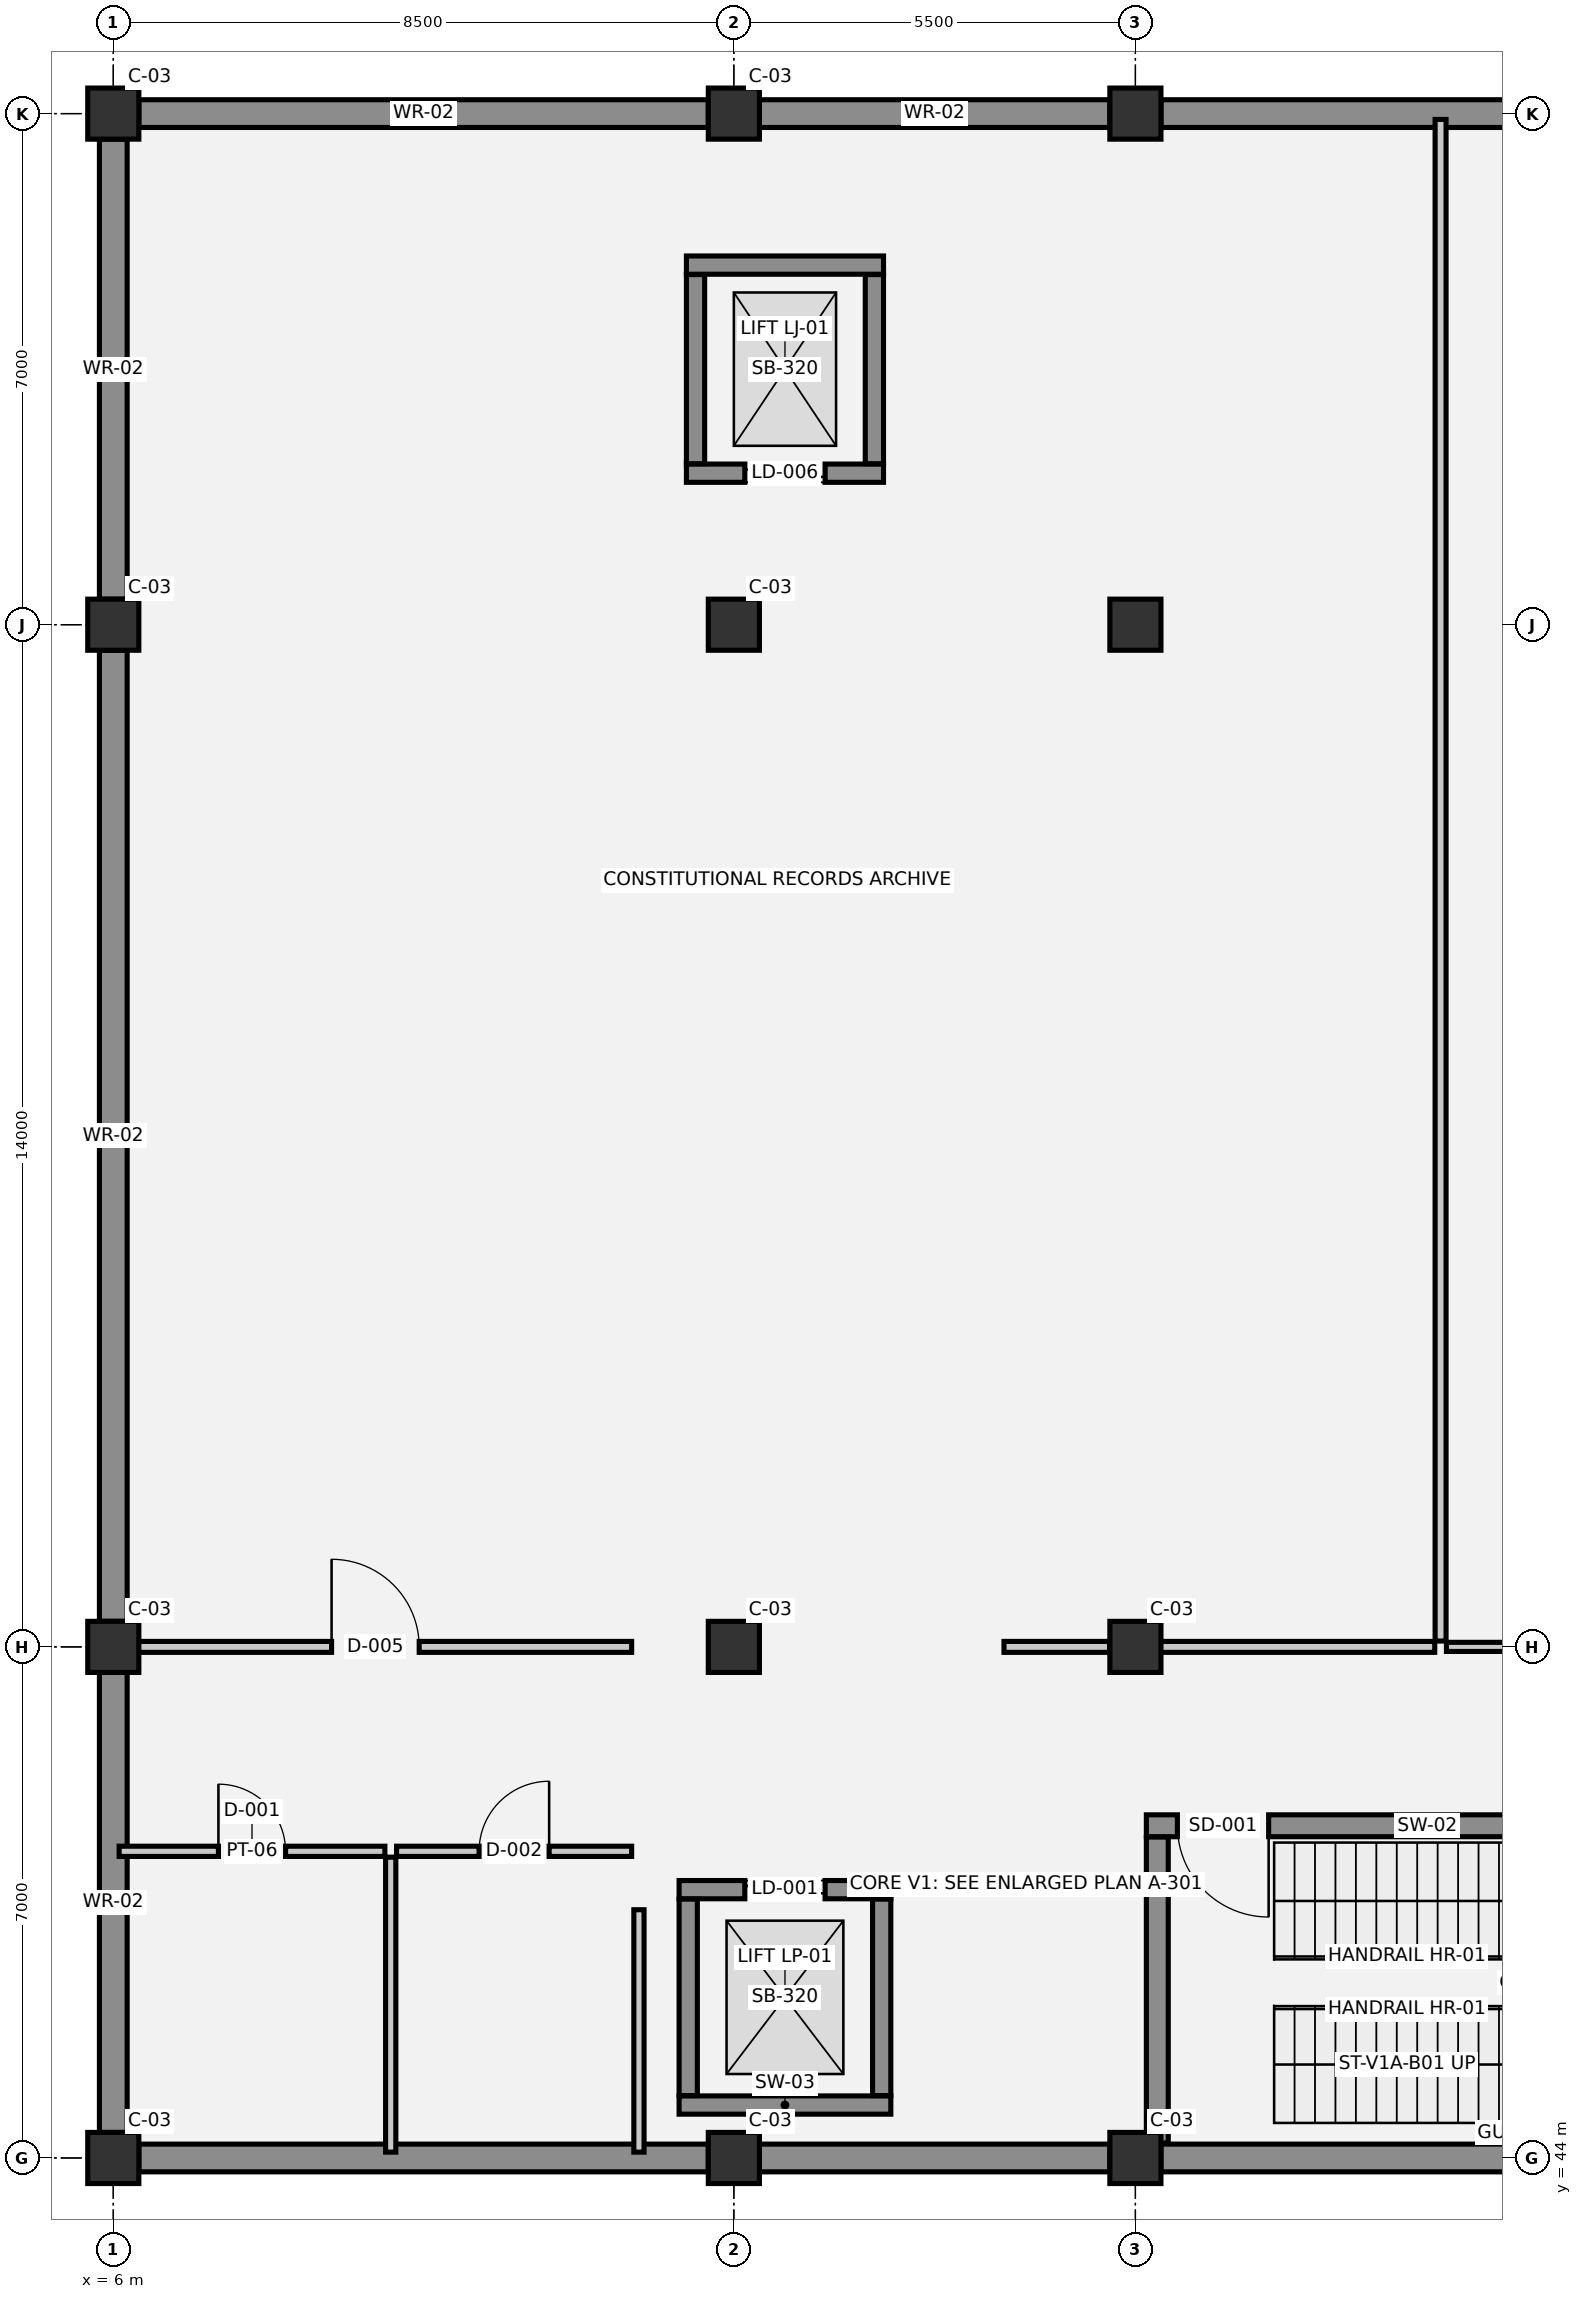
"""IFC4 building model, lengths in metres.
Left out: names, types, materials, properties, quantities, classifications, styles, units other than length and angle.
Written with IfcOpenShell. Run it as: python <this file> out.ifc"""

import sys

from ifc_helpers import new_model, si_unit, direction, frame, frame_2d, origin, origin_2d, place, context, subcontext, project, spatial, rectangle, extrude, element, fill, save


model = new_model("IFC4")
c1 = context("Model", 3, precision=1e-05, world=origin(), true_north=direction((0.0, 1.0)))
c2 = subcontext(c1, "Body", "Model", "MODEL_VIEW")
j1 = project(units=[si_unit("LENGTHUNIT", "METRE"), si_unit("PLANEANGLEUNIT", "RADIAN")], contexts=[c1])
p1 = place(None, origin())
s1 = spatial("IfcSite", under=j1, at=p1, CompositionType="ELEMENT")
p2 = place(p1, origin())
s2 = spatial("IfcBuilding", under=s1, at=p2, CompositionType="ELEMENT")
p3 = place(p2, frame((0.0, 0.0, -4.5)))
s3 = spatial("IfcBuildingStorey", under=s2, at=p3, CompositionType="ELEMENT", Elevation=-4.5)
for number, where, z_axis, x_axis in (
    (1, (6.0, 44.0, 0.0), (0.0, 0.0, 1.0), (1.0, 0.0, 0.0)),
    (2, (6.0, 51.0, 0.0), (0.0, 0.0, 1.0), (1.0, 0.0, 0.0)),
    (3, (6.0, 65.0, 0.0), (0.0, 0.0, 1.0), (1.0, 0.0, 0.0)),
    (4, (6.0, 72.0, 0.0), (0.0, 0.0, 1.0), (1.0, 0.0, 0.0)),
    (5, (14.5, 44.0, 0.0), (0.0, 0.0, 1.0), (1.0, 0.0, 0.0)),
    (6, (14.5, 51.0, 0.0), (0.0, 0.0, 1.0), (1.0, 0.0, 0.0)),
    (7, (14.5, 65.0, 0.0), (0.0, 0.0, 1.0), (1.0, 0.0, 0.0)),
    (8, (14.5, 72.0, 0.0), (0.0, 0.0, 1.0), (1.0, 0.0, 0.0)),
    (9, (20.0, 44.0, 0.0), (0.0, 0.0, 1.0), (1.0, 0.0, 0.0)),
    (10, (20.0, 51.0, 0.0), (0.0, 0.0, 1.0), (1.0, 0.0, 0.0)),
    (11, (20.0, 65.0, 0.0), (0.0, 0.0, 1.0), (1.0, 0.0, 0.0)),
    (12, (20.0, 72.0, 0.0), (0.0, 0.0, 1.0), (1.0, 0.0, 0.0)),
):
    element("IfcColumn", number, at=place(p3, frame(where, z_axis=z_axis, x_axis=x_axis)), inside=s3, PredefinedType="COLUMN", context=c2, shape_type="SweptSolid", body=[
        extrude(rectangle(XDim=0.7, YDim=0.7, at=origin_2d()), origin(), (0.0, 0.0, 1.0), 4.5),
    ])
p4 = place(p3, frame((6.0, 44.35, 0.0), z_axis=(0.0, 0.0, 1.0), x_axis=(0.0, 1.0, 0.0)))
e13 = element("IfcWall", 13, at=p4, inside=s3, PredefinedType="STANDARD", context=c2, shape_type="SweptSolid", body=[
    extrude(rectangle(XDim=6.3, YDim=0.38, at=frame_2d((3.15, 0.0))), origin(), (0.0, 0.0, 1.0), 4.24),
])
p5 = place(p3, frame((6.0, 51.35, 0.0), z_axis=(0.0, 0.0, 1.0), x_axis=(0.0, 1.0, 0.0)))
e14 = element("IfcWall", 14, at=p5, inside=s3, PredefinedType="STANDARD", context=c2, shape_type="SweptSolid", body=[
    extrude(rectangle(XDim=13.3, YDim=0.38, at=frame_2d((6.65, 0.0))), origin(), (0.0, 0.0, 1.0), 4.24),
])
p6 = place(p3, frame((6.0, 65.35, 0.0), z_axis=(0.0, 0.0, 1.0), x_axis=(0.0, 1.0, 0.0)))
e15 = element("IfcWall", 15, at=p6, inside=s3, PredefinedType="STANDARD", context=c2, shape_type="SweptSolid", body=[
    extrude(rectangle(XDim=6.3, YDim=0.38, at=frame_2d((3.15, 0.0))), origin(), (0.0, 0.0, 1.0), 4.24),
])
p7 = place(p3, frame((6.35, 72.0, 0.0), z_axis=(0.0, 0.0, 1.0), x_axis=(1.0, 0.0, 0.0)))
e16 = element("IfcWall", 16, at=p7, inside=s3, PredefinedType="STANDARD", context=c2, shape_type="SweptSolid", body=[
    extrude(rectangle(XDim=7.8, YDim=0.38, at=frame_2d((3.9, 0.0))), origin(), (0.0, 0.0, 1.0), 4.24),
])
p8 = place(p3, frame((14.85, 72.0, 0.0), z_axis=(0.0, 0.0, 1.0), x_axis=(1.0, 0.0, 0.0)))
e17 = element("IfcWall", 17, at=p8, inside=s3, PredefinedType="STANDARD", context=c2, shape_type="SweptSolid", body=[
    extrude(rectangle(XDim=4.8, YDim=0.38, at=frame_2d((2.4, 0.0))), origin(), (0.0, 0.0, 1.0), 4.24),
])
for number, where, z_axis, x_axis in (
    (18, (20.35, 72.0, 0.0), (0.0, 0.0, 1.0), (1.0, 0.0, 0.0)),
    (19, (34.65, 44.0, 0.0), (0.0, 0.0, 1.0), (-1.0, 0.0, 0.0)),
):
    element("IfcWall", number, at=place(p3, frame(where, z_axis=z_axis, x_axis=x_axis)), inside=s3, PredefinedType="STANDARD", context=c2, shape_type="SweptSolid", body=[
        extrude(rectangle(XDim=14.3, YDim=0.38, at=frame_2d((7.15, 0.0))), origin(), (0.0, 0.0, 1.0), 4.24),
    ])
p9 = place(p3, frame((19.65, 44.0, 0.0), z_axis=(0.0, 0.0, 1.0), x_axis=(-1.0, 0.0, 0.0)))
e20 = element("IfcWall", 20, at=p9, inside=s3, PredefinedType="STANDARD", context=c2, shape_type="SweptSolid", body=[
    extrude(rectangle(XDim=4.8, YDim=0.38, at=frame_2d((2.4, 0.0))), origin(), (0.0, 0.0, 1.0), 4.24),
])
p10 = place(p3, frame((14.15, 44.0, 0.0), z_axis=(0.0, 0.0, 1.0), x_axis=(-1.0, 0.0, 0.0)))
e21 = element("IfcWall", 21, at=p10, inside=s3, PredefinedType="STANDARD", context=c2, shape_type="SweptSolid", body=[
    extrude(rectangle(XDim=7.8, YDim=0.38, at=frame_2d((3.9, 0.0))), origin(), (0.0, 0.0, 1.0), 4.24),
])
p11 = place(p3, frame((13.75, 44.725, 0.0), z_axis=(0.0, 0.0, 1.0), x_axis=(1.0, 0.0, 0.0)))
e22 = element("IfcWall", 22, at=p11, inside=s3, PredefinedType="SHEAR", context=c2, shape_type="SweptSolid", body=[
    extrude(rectangle(XDim=2.9, YDim=0.25, at=frame_2d((1.45, 0.0))), origin(), (0.0, 0.0, 1.0), 4.5),
])
p12 = place(p3, frame((16.65, 47.675, 0.0), z_axis=(0.0, 0.0, 1.0), x_axis=(-1.0, 0.0, 0.0)))
e23 = element("IfcWall", 23, at=p12, inside=s3, PredefinedType="SHEAR", context=c2, shape_type="SweptSolid", body=[
    extrude(rectangle(XDim=2.9, YDim=0.25, at=frame_2d((1.45, 0.0))), origin(), (0.0, 0.0, 1.0), 4.5),
])
p13 = place(p12, frame((0.9, 0.0, 0.0)))
e24 = element("IfcOpeningElement", 24, at=p13, cuts=e23, PredefinedType="OPENING", context=c2, shape_type="SweptSolid", body=[
    extrude(rectangle(XDim=1.1, YDim=2.15, at=frame_2d((0.55, 1.075))), frame((0.0, 0.135, 0.0), z_axis=(0.0, -1.0, 0.0), x_axis=(1.0, 0.0, 0.0)), (0.0, 0.0, 1.0), 0.27),
])
for number, where, z_axis, x_axis in (
    (25, (13.875, 47.545, 0.0), (0.0, 0.0, 1.0), (0.0, -1.0, 0.0)),
    (26, (16.525, 44.855, 0.0), (0.0, 0.0, 1.0), (0.0, 1.0, 0.0)),
):
    element("IfcWall", number, at=place(p3, frame(where, z_axis=z_axis, x_axis=x_axis)), inside=s3, PredefinedType="SHEAR", context=c2, shape_type="SweptSolid", body=[
        extrude(rectangle(XDim=2.69, YDim=0.25, at=frame_2d((1.345, 0.0))), origin(), (0.0, 0.0, 1.0), 4.5),
    ])
p14 = place(p3, frame((13.85, 67.075, 0.0), z_axis=(0.0, 0.0, 1.0), x_axis=(1.0, 0.0, 0.0)))
e27 = element("IfcWall", 27, at=p14, inside=s3, PredefinedType="SHEAR", context=c2, shape_type="SweptSolid", body=[
    extrude(rectangle(XDim=2.7, YDim=0.25, at=frame_2d((1.35, 0.0))), origin(), (0.0, 0.0, 1.0), 4.5),
])
p15 = place(p14, frame((0.8, 0.0, 0.0)))
e28 = element("IfcOpeningElement", 28, at=p15, cuts=e27, PredefinedType="OPENING", context=c2, shape_type="SweptSolid", body=[
    extrude(rectangle(XDim=1.1, YDim=2.15, at=frame_2d((0.55, 1.075))), frame((0.0, 0.135, 0.0), z_axis=(0.0, -1.0, 0.0), x_axis=(1.0, 0.0, 0.0)), (0.0, 0.0, 1.0), 0.27),
])
p16 = place(p3, frame((16.55, 69.925, 0.0), z_axis=(0.0, 0.0, 1.0), x_axis=(-1.0, 0.0, 0.0)))
e29 = element("IfcWall", 29, at=p16, inside=s3, PredefinedType="SHEAR", context=c2, shape_type="SweptSolid", body=[
    extrude(rectangle(XDim=2.7, YDim=0.25, at=frame_2d((1.35, 0.0))), origin(), (0.0, 0.0, 1.0), 4.5),
])
for number, where, z_axis, x_axis in (
    (30, (13.975, 69.795, 0.0), (0.0, 0.0, 1.0), (0.0, -1.0, 0.0)),
    (31, (16.425, 67.205, 0.0), (0.0, 0.0, 1.0), (0.0, 1.0, 0.0)),
):
    element("IfcWall", number, at=place(p3, frame(where, z_axis=z_axis, x_axis=x_axis)), inside=s3, PredefinedType="SHEAR", context=c2, shape_type="SweptSolid", body=[
        extrude(rectangle(XDim=2.59, YDim=0.25, at=frame_2d((1.295, 0.0))), origin(), (0.0, 0.0, 1.0), 4.5),
    ])
p17 = place(p3, frame((27.85, 48.55, 0.0), z_axis=(0.0, 0.0, 1.0), x_axis=(-1.0, 0.0, 0.0)))
e32 = element("IfcWall", 32, at=p17, inside=s3, PredefinedType="SHEAR", context=c2, shape_type="SweptSolid", body=[
    extrude(rectangle(XDim=7.7, YDim=0.3, at=frame_2d((3.85, 0.0))), origin(), (0.0, 0.0, 1.0), 4.24),
])
p18 = place(p17, frame((6.025, 0.0, 0.0)))
e33 = element("IfcOpeningElement", 33, at=p18, cuts=e32, PredefinedType="OPENING", context=c2, shape_type="SweptSolid", body=[
    extrude(rectangle(XDim=1.25, YDim=2.15, at=frame_2d((0.625, 1.075))), frame((0.0, 0.16, 0.0), z_axis=(0.0, -1.0, 0.0), x_axis=(1.0, 0.0, 0.0)), (0.0, 0.0, 1.0), 0.32),
])
p19 = place(p3, frame((20.3, 48.395, 0.0), z_axis=(0.0, 0.0, 1.0), x_axis=(0.0, -1.0, 0.0)))
e34 = element("IfcWall", 34, at=p19, inside=s3, PredefinedType="SHEAR", context=c2, shape_type="SweptSolid", body=[
    extrude(rectangle(XDim=4.19, YDim=0.3, at=frame_2d((2.095, 0.0))), origin(), (0.0, 0.0, 1.0), 4.24),
])
p20 = place(p3, frame((6.08, 48.2, 0.0), z_axis=(0.0, 0.0, 1.0), x_axis=(1.0, 0.0, 0.0)))
e35 = element("IfcWall", 35, at=p20, inside=s3, PredefinedType="PLUMBINGWALL", context=c2, shape_type="SweptSolid", body=[
    extrude(rectangle(XDim=3.64, YDim=0.14, at=frame_2d((1.82, 0.0))), origin(), (0.0, 0.0, 1.0), 4.14),
])
p21 = place(p20, frame((1.36, 0.0, 0.0)))
e36 = element("IfcOpeningElement", 36, at=p21, cuts=e35, PredefinedType="OPENING", context=c2, shape_type="SweptSolid", body=[
    extrude(rectangle(XDim=0.92, YDim=2.1, at=frame_2d((0.46, 1.05))), frame((0.0, 0.08, 0.0), z_axis=(0.0, -1.0, 0.0), x_axis=(1.0, 0.0, 0.0)), (0.0, 0.0, 1.0), 0.16),
])
p22 = place(p3, frame((9.88, 48.2, 0.0), z_axis=(0.0, 0.0, 1.0), x_axis=(1.0, 0.0, 0.0)))
e37 = element("IfcWall", 37, at=p22, inside=s3, PredefinedType="PLUMBINGWALL", context=c2, shape_type="SweptSolid", body=[
    extrude(rectangle(XDim=3.22, YDim=0.14, at=frame_2d((1.61, 0.0))), origin(), (0.0, 0.0, 1.0), 4.14),
])
p23 = place(p22, frame((1.13, 0.0, 0.0)))
e38 = element("IfcOpeningElement", 38, at=p23, cuts=e37, PredefinedType="OPENING", context=c2, shape_type="SweptSolid", body=[
    extrude(rectangle(XDim=0.96, YDim=2.1, at=frame_2d((0.48, 1.05))), frame((0.0, 0.08, 0.0), z_axis=(0.0, -1.0, 0.0), x_axis=(1.0, 0.0, 0.0)), (0.0, 0.0, 1.0), 0.16),
])
p24 = place(p3, frame((6.08, 51.0, 0.0), z_axis=(0.0, 0.0, 1.0), x_axis=(1.0, 0.0, 0.0)))
e39 = element("IfcWall", 39, at=p24, inside=s3, PredefinedType="PARTITIONING", context=c2, shape_type="SweptSolid", body=[
    extrude(rectangle(XDim=7.02, YDim=0.15, at=frame_2d((3.51, 0.0))), origin(), (0.0, 0.0, 1.0), 3.53),
])
p25 = place(p24, frame((2.91, 0.0, 0.0)))
e40 = element("IfcOpeningElement", 40, at=p25, cuts=e39, PredefinedType="OPENING", context=c2, shape_type="SweptSolid", body=[
    extrude(rectangle(XDim=1.2, YDim=2.15, at=frame_2d((0.6, 1.075))), frame((0.0, 0.085, 0.0), z_axis=(0.0, -1.0, 0.0), x_axis=(1.0, 0.0, 0.0)), (0.0, 0.0, 1.0), 0.17),
])
p26 = place(p3, frame((18.2, 51.0, 0.0), z_axis=(0.0, 0.0, 1.0), x_axis=(1.0, 0.0, 0.0)))
e41 = element("IfcWall", 41, at=p26, inside=s3, PredefinedType="PARTITIONING", context=c2, shape_type="SweptSolid", body=[
    extrude(rectangle(XDim=1.45, YDim=0.15, at=frame_2d((0.725, 0.0))), origin(), (0.0, 0.0, 1.0), 3.53),
])
p27 = place(p3, frame((19.65, 51.0, 0.0), z_axis=(0.0, 0.0, 1.0), x_axis=(1.0, 0.0, 0.0)))
e42 = element("IfcWall", 42, at=p27, inside=s3, PredefinedType="PARTITIONING", context=c2, shape_type="SweptSolid", body=[
    extrude(rectangle(XDim=4.45, YDim=0.15, at=frame_2d((2.225, 0.0))), origin(), (0.0, 0.0, 1.0), 3.28),
])
p28 = place(p3, frame((24.26, 51.0, 0.0), z_axis=(0.0, 0.0, 1.0), x_axis=(1.0, 0.0, 0.0)))
e43 = element("IfcWall", 43, at=p28, inside=s3, PredefinedType="PARTITIONING", context=c2, shape_type="SweptSolid", body=[
    extrude(rectangle(XDim=14.99, YDim=0.125, at=frame_2d((7.495, 0.0))), origin(), (0.0, 0.0, 1.0), 3.28),
])
p29 = place(p28, frame((6.895, 0.0, 0.0)))
e44 = element("IfcOpeningElement", 44, at=p29, cuts=e43, PredefinedType="OPENING", context=c2, shape_type="SweptSolid", body=[
    extrude(rectangle(XDim=1.2, YDim=2.15, at=frame_2d((0.6, 1.075))), frame((0.0, 0.073, 0.0), z_axis=(0.0, -1.0, 0.0), x_axis=(1.0, 0.0, 0.0)), (0.0, 0.0, 1.0), 0.145),
])
p30 = place(p3, frame((9.8, 44.08, 0.0), z_axis=(0.0, 0.0, 1.0), x_axis=(0.0, 1.0, 0.0)))
e45 = element("IfcWall", 45, at=p30, inside=s3, PredefinedType="PLUMBINGWALL", context=c2, shape_type="SweptSolid", body=[
    extrude(rectangle(XDim=4.04, YDim=0.14, at=frame_2d((2.02, 0.0))), origin(), (0.0, 0.0, 1.0), 4.14),
])
p31 = place(p3, frame((13.2, 44.08, 0.0), z_axis=(0.0, 0.0, 1.0), x_axis=(0.0, 1.0, 0.0)))
e46 = element("IfcWall", 46, at=p31, inside=s3, PredefinedType="PLUMBINGWALL", context=c2, shape_type="SweptSolid", body=[
    extrude(rectangle(XDim=3.32, YDim=0.14, at=frame_2d((1.66, 0.0))), origin(), (0.0, 0.0, 1.0), 4.14),
])
p32 = place(p3, frame((24.18, 51.08, 0.0), z_axis=(0.0, 0.0, 1.0), x_axis=(0.0, 1.0, 0.0)))
e47 = element("IfcWall", 47, at=p32, inside=s3, PredefinedType="PARTITIONING", context=c2, shape_type="SweptSolid", body=[
    extrude(rectangle(XDim=20.84, YDim=0.15, at=frame_2d((10.42, 0.0))), origin(), (0.0, 0.0, 1.0), 4.14),
])
p33 = place(p13, origin())
e48 = element("IfcDoor", 48, at=p33, inside=s3, OperationType="DOUBLE_DOOR_SLIDING", PredefinedType="DOOR", context=c2, shape_type="SweptSolid", body=[
    extrude(rectangle(XDim=1.1, YDim=2.15, at=frame_2d((0.55, 1.075))), frame((0.0, 0.025, 0.0), z_axis=(0.0, -1.0, 0.0), x_axis=(1.0, 0.0, 0.0)), (0.0, 0.0, 1.0), 0.05),
])
fill(e24, e48)
p34 = place(p15, origin())
e49 = element("IfcDoor", 49, at=p34, inside=s3, OperationType="DOUBLE_DOOR_SLIDING", PredefinedType="DOOR", context=c2, shape_type="SweptSolid", body=[
    extrude(rectangle(XDim=1.1, YDim=2.15, at=frame_2d((0.55, 1.075))), frame((0.0, 0.025, 0.0), z_axis=(0.0, -1.0, 0.0), x_axis=(1.0, 0.0, 0.0)), (0.0, 0.0, 1.0), 0.05),
])
fill(e28, e49)
p35 = place(p18, origin())
e50 = element("IfcDoor", 50, at=p35, inside=s3, OperationType="SINGLE_SWING_LEFT", PredefinedType="DOOR", context=c2, shape_type="SweptSolid", body=[
    extrude(rectangle(XDim=1.25, YDim=2.15, at=frame_2d((0.625, 1.075))), frame((0.0, 0.025, 0.0), z_axis=(0.0, -1.0, 0.0), x_axis=(1.0, 0.0, 0.0)), (0.0, 0.0, 1.0), 0.05),
])
fill(e33, e50)
p36 = place(p21, origin())
e51 = element("IfcDoor", 51, at=p36, inside=s3, OperationType="SINGLE_SWING_LEFT", PredefinedType="DOOR", context=c2, shape_type="SweptSolid", body=[
    extrude(rectangle(XDim=0.92, YDim=2.1, at=frame_2d((0.46, 1.05))), frame((0.0, 0.025, 0.0), z_axis=(0.0, -1.0, 0.0), x_axis=(1.0, 0.0, 0.0)), (0.0, 0.0, 1.0), 0.05),
])
fill(e36, e51)
p37 = place(p23, origin())
e52 = element("IfcDoor", 52, at=p37, inside=s3, OperationType="SINGLE_SWING_RIGHT", PredefinedType="DOOR", context=c2, shape_type="SweptSolid", body=[
    extrude(rectangle(XDim=0.96, YDim=2.1, at=frame_2d((0.48, 1.05))), frame((0.0, 0.025, 0.0), z_axis=(0.0, -1.0, 0.0), x_axis=(1.0, 0.0, 0.0)), (0.0, 0.0, 1.0), 0.05),
])
fill(e38, e52)
p38 = place(p25, origin())
e53 = element("IfcDoor", 53, at=p38, inside=s3, OperationType="SINGLE_SWING_LEFT", PredefinedType="DOOR", context=c2, shape_type="SweptSolid", body=[
    extrude(rectangle(XDim=1.2, YDim=2.15, at=frame_2d((0.6, 1.075))), frame((0.0, 0.025, 0.0), z_axis=(0.0, -1.0, 0.0), x_axis=(1.0, 0.0, 0.0)), (0.0, 0.0, 1.0), 0.05),
])
fill(e40, e53)
save(model, sys.argv[1])
